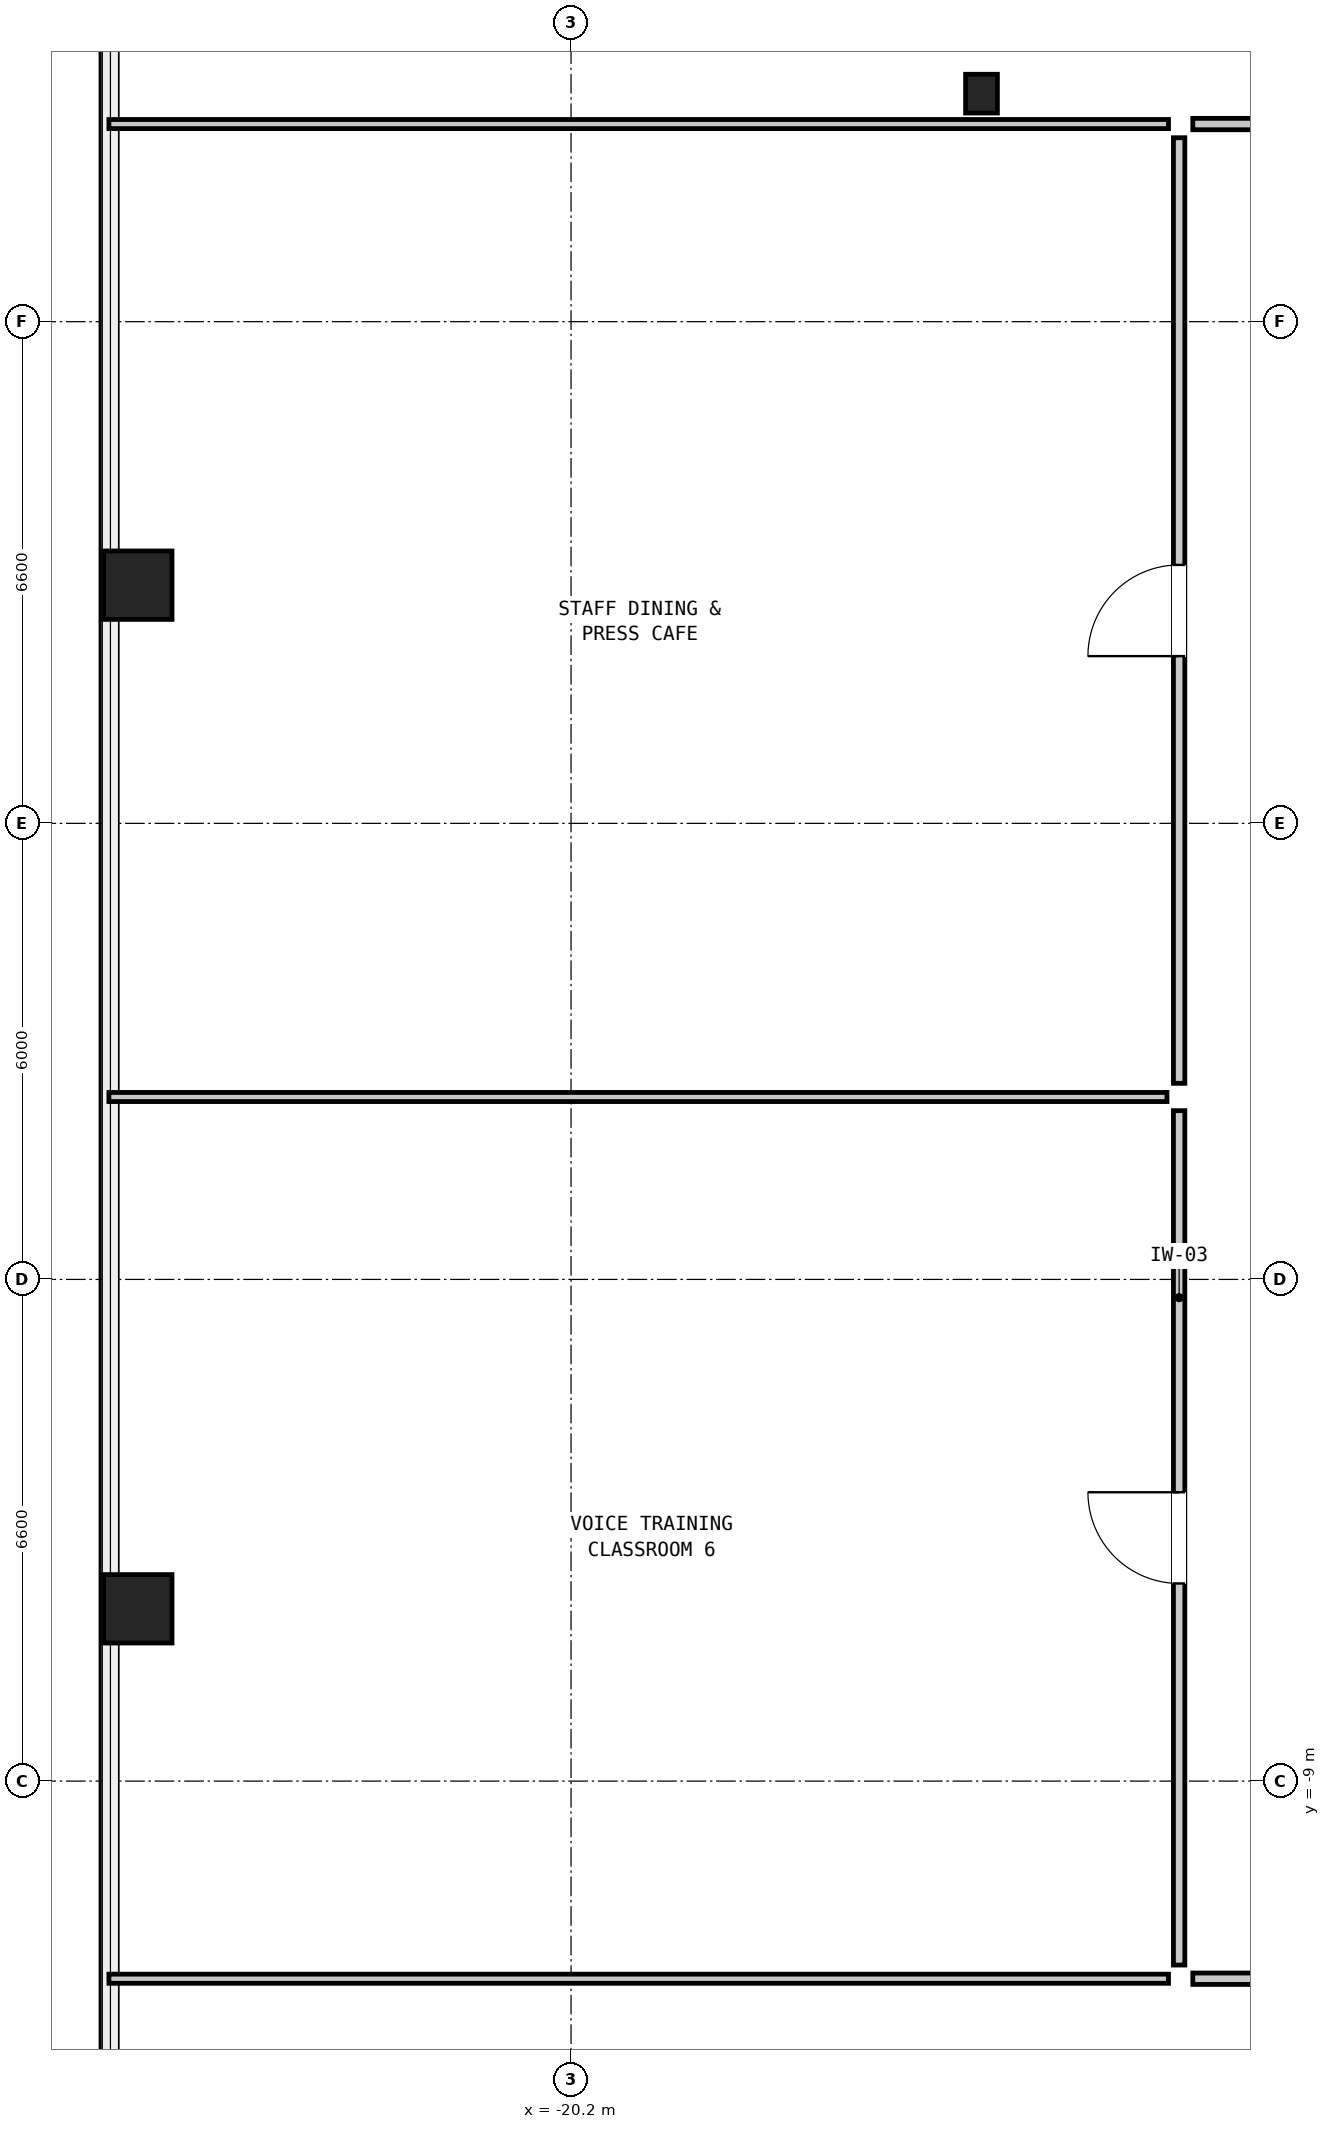
"""IFC4 building model, lengths in metres.
Left out: names, types, materials, properties, quantities, classifications, styles, units other than length and angle.
Written with IfcOpenShell. Run it as: python <this file> out.ifc"""

import sys

from ifc_helpers import new_model, si_unit, direction, frame, frame_2d, origin, origin_2d, place, context, subcontext, project, spatial, rectangle, hollow_rectangle, i_section, extrude, element, fill, save


model = new_model("IFC4")
c1 = context("Model", 3, precision=1e-05, world=origin(), true_north=direction((0.0, 1.0)))
c2 = subcontext(c1, "Body", "Model", "MODEL_VIEW")
j1 = project(units=[si_unit("LENGTHUNIT", "METRE"), si_unit("PLANEANGLEUNIT", "RADIAN")], contexts=[c1])
p1 = place(None, origin())
s1 = spatial("IfcSite", under=j1, at=p1, CompositionType="ELEMENT")
p2 = place(p1, origin())
s2 = spatial("IfcBuilding", under=s1, at=p2, CompositionType="ELEMENT")
p3 = place(p2, frame((0.0, 0.0, 53.55)))
s3 = spatial("IfcBuildingStorey", under=s2, at=p3, CompositionType="ELEMENT", Elevation=53.55)
for number, where, z_axis, x_axis in (
    (1, (-25.9, 6.733, 0.0), (0.0, 0.0, 1.0), (0.0, 1.0, 0.0)),
    (2, (-25.9, -6.733, 0.0), (0.0, 0.0, 1.0), (0.0, 1.0, 0.0)),
):
    element("IfcColumn", number, at=place(p3, frame(where, z_axis=z_axis, x_axis=x_axis)), inside=s3, PredefinedType="COLUMN", context=c2, shape_type="SweptSolid", body=[
        extrude(hollow_rectangle(XDim=0.9, YDim=0.9, WallThickness=0.055, at=origin_2d()), origin(), (0.0, 0.0, 1.0), 4.35),
    ])
p4 = place(p3, frame((-14.8, 13.2, 0.0), z_axis=(0.0, 0.0, 1.0), x_axis=(1.0, 0.0, 0.0)))
e3 = element("IfcColumn", 3, at=p4, inside=s3, PredefinedType="COLUMN", context=c2, shape_type="SweptSolid", body=[
    extrude(i_section(OverallWidth=0.418, OverallDepth=0.51, WebThickness=0.042, FlangeThickness=0.068, at=origin_2d()), origin(), (0.0, 0.0, 1.0), 4.35),
])
p5 = place(p3, frame((-26.28, 12.8, 0.0), z_axis=(0.0, 0.0, 1.0), x_axis=(1.0, 0.0, 0.0)))
e4 = element("IfcWall", 4, at=p5, inside=s3, PredefinedType="PARTITIONING", context=c2, shape_type="SweptSolid", body=[
    extrude(rectangle(XDim=13.94, YDim=0.12, at=frame_2d((6.97, 0.0))), origin(), (0.0, 0.0, 1.0), 4.07),
])
p6 = place(p3, frame((-26.28, -11.6, 0.0), z_axis=(0.0, 0.0, 1.0), x_axis=(1.0, 0.0, 0.0)))
e5 = element("IfcWall", 5, at=p6, inside=s3, PredefinedType="PARTITIONING", context=c2, shape_type="SweptSolid", body=[
    extrude(rectangle(XDim=13.94, YDim=0.12, at=frame_2d((6.97, 0.0))), origin(), (0.0, 0.0, 1.0), 3.288),
])
p7 = place(p3, frame((-26.28, 0.0, 0.0), z_axis=(0.0, 0.0, 1.0), x_axis=(1.0, 0.0, 0.0)))
e6 = element("IfcWall", 6, at=p7, inside=s3, PredefinedType="PARTITIONING", context=c2, shape_type="SweptSolid", body=[
    extrude(rectangle(XDim=13.92, YDim=0.12, at=frame_2d((6.96, 0.0))), origin(), (0.0, 0.0, 1.0), 4.07),
])
p8 = place(p3, frame((-12.02, 12.8, 0.0), z_axis=(0.0, 0.0, 1.0), x_axis=(1.0, 0.0, 0.0)))
e7 = element("IfcWall", 7, at=p8, inside=s3, PredefinedType="PARTITIONING", context=c2, shape_type="SweptSolid", body=[
    extrude(rectangle(XDim=6.44, YDim=0.15, at=frame_2d((3.22, 0.0))), origin(), (0.0, 0.0, 1.0), 4.07),
])
p9 = place(p8, frame((2.62, 0.0, 0.0)))
e8 = element("IfcOpeningElement", 8, at=p9, cuts=e7, PredefinedType="OPENING", context=c2, shape_type="SweptSolid", body=[
    extrude(rectangle(XDim=1.2, YDim=2.1, at=frame_2d((0.6, 1.05))), frame((0.0, 0.087, 0.0), z_axis=(0.0, -1.0, 0.0), x_axis=(1.0, 0.0, 0.0)), (0.0, 0.0, 1.0), 0.174),
])
p10 = place(p3, frame((-12.02, -11.6, 0.0), z_axis=(0.0, 0.0, 1.0), x_axis=(1.0, 0.0, 0.0)))
e9 = element("IfcWall", 9, at=p10, inside=s3, PredefinedType="PARTITIONING", context=c2, shape_type="SweptSolid", body=[
    extrude(rectangle(XDim=11.84, YDim=0.15, at=frame_2d((5.92, 0.0))), origin(), (0.0, 0.0, 1.0), 3.288),
])
p11 = place(p10, frame((5.32, 0.0, 0.0)))
e10 = element("IfcOpeningElement", 10, at=p11, cuts=e9, PredefinedType="OPENING", context=c2, shape_type="SweptSolid", body=[
    extrude(rectangle(XDim=1.2, YDim=2.1, at=frame_2d((0.6, 1.05))), frame((0.0, 0.087, 0.0), z_axis=(0.0, -1.0, 0.0), x_axis=(1.0, 0.0, 0.0)), (0.0, 0.0, 1.0), 0.174),
])
p12 = place(p3, frame((-12.2, -11.42, 0.0), z_axis=(0.0, 0.0, 1.0), x_axis=(0.0, 1.0, 0.0)))
e11 = element("IfcWall", 11, at=p12, inside=s3, PredefinedType="PARTITIONING", context=c2, shape_type="SweptSolid", body=[
    extrude(rectangle(XDim=11.24, YDim=0.15, at=frame_2d((5.62, 0.0))), origin(), (0.0, 0.0, 1.0), 4.07),
])
p13 = place(p12, frame((5.02, 0.0, 0.0)))
e12 = element("IfcOpeningElement", 12, at=p13, cuts=e11, PredefinedType="OPENING", context=c2, shape_type="SweptSolid", body=[
    extrude(rectangle(XDim=1.2, YDim=2.1, at=frame_2d((0.6, 1.05))), frame((0.0, 0.087, 0.0), z_axis=(0.0, -1.0, 0.0), x_axis=(1.0, 0.0, 0.0)), (0.0, 0.0, 1.0), 0.174),
])
p14 = place(p3, frame((-12.2, 0.18, 0.0), z_axis=(0.0, 0.0, 1.0), x_axis=(0.0, 1.0, 0.0)))
e13 = element("IfcWall", 13, at=p14, inside=s3, PredefinedType="PARTITIONING", context=c2, shape_type="SweptSolid", body=[
    extrude(rectangle(XDim=12.44, YDim=0.15, at=frame_2d((6.22, 0.0))), origin(), (0.0, 0.0, 1.0), 4.07),
])
p15 = place(p14, frame((5.62, 0.0, 0.0)))
e14 = element("IfcOpeningElement", 14, at=p15, cuts=e13, PredefinedType="OPENING", context=c2, shape_type="SweptSolid", body=[
    extrude(rectangle(XDim=1.2, YDim=2.1, at=frame_2d((0.6, 1.05))), frame((0.0, 0.087, 0.0), z_axis=(0.0, -1.0, 0.0), x_axis=(1.0, 0.0, 0.0)), (0.0, 0.0, 1.0), 0.174),
])
p16 = place(p13, origin())
e15 = element("IfcDoor", 15, at=p16, inside=s3, OperationType="SINGLE_SWING_RIGHT", PredefinedType="DOOR", context=c2, shape_type="SweptSolid", body=[
    extrude(rectangle(XDim=1.2, YDim=2.1, at=frame_2d((0.6, 1.05))), frame((0.0, 0.025, 0.0), z_axis=(0.0, -1.0, 0.0), x_axis=(1.0, 0.0, 0.0)), (0.0, 0.0, 1.0), 0.05),
])
fill(e12, e15)
p17 = place(p15, origin())
e16 = element("IfcDoor", 16, at=p17, inside=s3, OperationType="SINGLE_SWING_LEFT", PredefinedType="DOOR", context=c2, shape_type="SweptSolid", body=[
    extrude(rectangle(XDim=1.2, YDim=2.1, at=frame_2d((0.6, 1.05))), frame((0.0, 0.025, 0.0), z_axis=(0.0, -1.0, 0.0), x_axis=(1.0, 0.0, 0.0)), (0.0, 0.0, 1.0), 0.05),
])
fill(e14, e16)
save(model, sys.argv[1])
